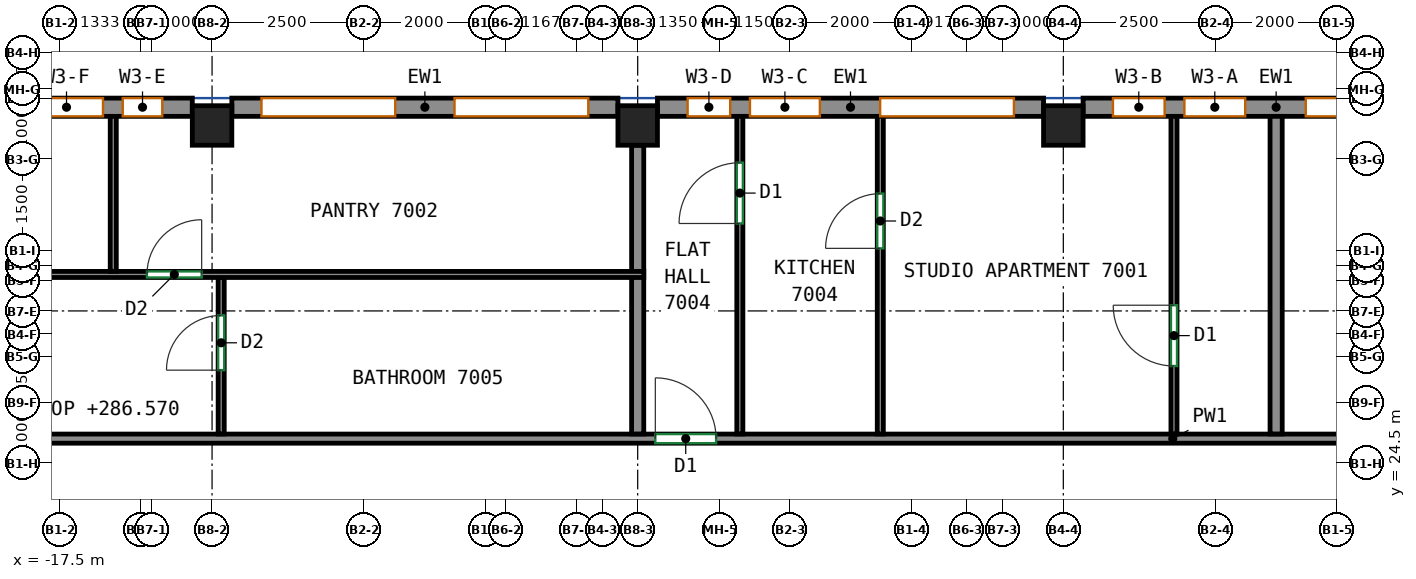
"""IFC4 building model, lengths in metres.
Left out: names, types, materials, properties, quantities, classifications, styles, units other than length and angle.
Written with IfcOpenShell. Run it as: python <this file> out.ifc"""

import sys

from ifc_helpers import new_model, si_unit, direction, frame, frame_2d, origin, origin_2d, place, context, subcontext, project, spatial, rectangle, extrude, source, transform, mapped, element, fill, save


model = new_model("IFC4")
c1 = context("Model", 3, precision=1e-05, world=origin(), true_north=direction((0.0, 1.0)))
c2 = subcontext(c1, "Body", "Model", "MODEL_VIEW")
j1 = project(units=[si_unit("LENGTHUNIT", "METRE"), si_unit("PLANEANGLEUNIT", "RADIAN")], contexts=[c1])
p1 = place(None, origin())
s1 = spatial("IfcSite", under=j1, at=p1, CompositionType="ELEMENT")
p2 = place(p1, origin())
s2 = spatial("IfcBuilding", under=s1, at=p2, CompositionType="ELEMENT")
p3 = place(p2, frame((0.0, 0.0, 284.0)))
s3 = spatial("IfcBuildingStorey", under=s2, at=p3, CompositionType="ELEMENT", Elevation=284.0)
m1 = source(origin(), c2, "Body", "SweptSolid", [
    extrude(rectangle(XDim=0.65, YDim=0.65, at=origin_2d()), origin(), (0.0, 0.0, 1.0), 3.12),
])
for number, where, z_axis, x_axis in (
    (1, (-15.0, 30.05, 0.0), (0.0, 0.0, 1.0), (1.0, 0.0, 0.0)),
    (2, (-8.0, 30.05, 0.0), (0.0, 0.0, 1.0), (1.0, 0.0, 0.0)),
    (3, (-1.0, 30.05, 0.0), (0.0, 0.0, 1.0), (1.0, 0.0, 0.0)),
):
    element("IfcColumn", number, at=place(p3, frame(where, z_axis=z_axis, x_axis=x_axis)), inside=s3, PredefinedType="COLUMN", context=c2, shape_type="MappedRepresentation", body=[
        mapped(m1, transform((0.0, 0.0, 0.0))),
    ])
m2 = source(origin(), c2, "Body", "SweptSolid", [
    extrude(rectangle(XDim=6.35, YDim=0.3, at=frame_2d((3.175, 0.0))), origin(), (0.0, 0.0, 1.0), 3.12),
])
p4 = place(p3, frame((5.675, 30.35, 0.0), z_axis=(0.0, 0.0, 1.0), x_axis=(-1.0, 0.0, 0.0)))
e4 = element("IfcWall", 4, at=p4, inside=s3, PredefinedType="SOLIDWALL", context=c2, shape_type="MappedRepresentation", body=[
    mapped(m2, transform((0.0, 0.0, 0.0))),
])
p5 = place(p4, frame((0.488, 0.0, 0.8)))
e5 = element("IfcOpeningElement", 5, at=p5, cuts=e4, PredefinedType="OPENING", context=c2, shape_type="SweptSolid", body=[
    extrude(rectangle(XDim=2.2, YDim=2.05, at=frame_2d((1.1, 1.025))), frame((0.0, 0.16, 0.0), z_axis=(0.0, -1.0, 0.0), x_axis=(1.0, 0.0, 0.0)), (0.0, 0.0, 1.0), 0.32),
])
p6 = place(p4, frame((3.684, 0.0, 0.8)))
e6 = element("IfcOpeningElement", 6, at=p6, cuts=e4, PredefinedType="OPENING", context=c2, shape_type="SweptSolid", body=[
    extrude(rectangle(XDim=1.0, YDim=2.05, at=frame_2d((0.5, 1.025))), frame((0.0, 0.16, 0.0), z_axis=(0.0, -1.0, 0.0), x_axis=(1.0, 0.0, 0.0)), (0.0, 0.0, 1.0), 0.32),
])
p7 = place(p4, frame((5.009, 0.0, 0.8)))
e7 = element("IfcOpeningElement", 7, at=p7, cuts=e4, PredefinedType="OPENING", context=c2, shape_type="SweptSolid", body=[
    extrude(rectangle(XDim=0.85, YDim=2.05, at=frame_2d((0.425, 1.025))), frame((0.0, 0.16, 0.0), z_axis=(0.0, -1.0, 0.0), x_axis=(1.0, 0.0, 0.0)), (0.0, 0.0, 1.0), 0.32),
])
p8 = place(p3, frame((-1.325, 30.35, 0.0), z_axis=(0.0, 0.0, 1.0), x_axis=(-1.0, 0.0, 0.0)))
e8 = element("IfcWall", 8, at=p8, inside=s3, PredefinedType="SOLIDWALL", context=c2, shape_type="MappedRepresentation", body=[
    mapped(m2, transform((0.0, 0.0, 0.0))),
])
p9 = place(p8, frame((0.488, 0.0, 0.8)))
e9 = element("IfcOpeningElement", 9, at=p9, cuts=e8, PredefinedType="OPENING", context=c2, shape_type="SweptSolid", body=[
    extrude(rectangle(XDim=2.2, YDim=2.05, at=frame_2d((1.1, 1.025))), frame((0.0, 0.16, 0.0), z_axis=(0.0, -1.0, 0.0), x_axis=(1.0, 0.0, 0.0)), (0.0, 0.0, 1.0), 0.32),
])
p10 = place(p8, frame((3.679, 0.0, 0.8)))
e10 = element("IfcOpeningElement", 10, at=p10, cuts=e8, PredefinedType="OPENING", context=c2, shape_type="SweptSolid", body=[
    extrude(rectangle(XDim=1.15, YDim=2.05, at=frame_2d((0.575, 1.025))), frame((0.0, 0.16, 0.0), z_axis=(0.0, -1.0, 0.0), x_axis=(1.0, 0.0, 0.0)), (0.0, 0.0, 1.0), 0.32),
])
p11 = place(p8, frame((5.154, 0.0, 0.8)))
e11 = element("IfcOpeningElement", 11, at=p11, cuts=e8, PredefinedType="OPENING", context=c2, shape_type="SweptSolid", body=[
    extrude(rectangle(XDim=0.7, YDim=2.05, at=frame_2d((0.35, 1.025))), frame((0.0, 0.16, 0.0), z_axis=(0.0, -1.0, 0.0), x_axis=(1.0, 0.0, 0.0)), (0.0, 0.0, 1.0), 0.32),
])
p12 = place(p3, frame((-8.325, 30.35, 0.0), z_axis=(0.0, 0.0, 1.0), x_axis=(-1.0, 0.0, 0.0)))
e12 = element("IfcWall", 12, at=p12, inside=s3, PredefinedType="SOLIDWALL", context=c2, shape_type="MappedRepresentation", body=[
    mapped(m2, transform((0.0, 0.0, 0.0))),
])
p13 = place(p12, frame((0.488, 0.0, 0.8)))
e13 = element("IfcOpeningElement", 13, at=p13, cuts=e12, PredefinedType="OPENING", context=c2, shape_type="SweptSolid", body=[
    extrude(rectangle(XDim=2.2, YDim=2.05, at=frame_2d((1.1, 1.025))), frame((0.0, 0.16, 0.0), z_axis=(0.0, -1.0, 0.0), x_axis=(1.0, 0.0, 0.0)), (0.0, 0.0, 1.0), 0.32),
])
p14 = place(p12, frame((3.663, 0.0, 0.8)))
e14 = element("IfcOpeningElement", 14, at=p14, cuts=e12, PredefinedType="OPENING", context=c2, shape_type="SweptSolid", body=[
    extrude(rectangle(XDim=2.2, YDim=2.05, at=frame_2d((1.1, 1.025))), frame((0.0, 0.16, 0.0), z_axis=(0.0, -1.0, 0.0), x_axis=(1.0, 0.0, 0.0)), (0.0, 0.0, 1.0), 0.32),
])
p15 = place(p3, frame((-15.325, 30.35, 0.0), z_axis=(0.0, 0.0, 1.0), x_axis=(-1.0, 0.0, 0.0)))
e15 = element("IfcWall", 15, at=p15, inside=s3, PredefinedType="SOLIDWALL", context=c2, shape_type="MappedRepresentation", body=[
    mapped(m2, transform((0.0, 0.0, 0.0))),
])
p16 = place(p15, frame((0.494, 0.0, 0.8)))
e16 = element("IfcOpeningElement", 16, at=p16, cuts=e15, PredefinedType="OPENING", context=c2, shape_type="SweptSolid", body=[
    extrude(rectangle(XDim=0.65, YDim=2.05, at=frame_2d((0.325, 1.025))), frame((0.0, 0.16, 0.0), z_axis=(0.0, -1.0, 0.0), x_axis=(1.0, 0.0, 0.0)), (0.0, 0.0, 1.0), 0.32),
])
p17 = place(p15, frame((3.663, 0.0, 0.8)))
e17 = element("IfcOpeningElement", 17, at=p17, cuts=e15, PredefinedType="OPENING", context=c2, shape_type="SweptSolid", body=[
    extrude(rectangle(XDim=2.2, YDim=2.05, at=frame_2d((1.1, 1.025))), frame((0.0, 0.16, 0.0), z_axis=(0.0, -1.0, 0.0), x_axis=(1.0, 0.0, 0.0)), (0.0, 0.0, 1.0), 0.32),
])
p18 = place(p15, frame((1.469, 0.0, 0.8)))
e18 = element("IfcOpeningElement", 18, at=p18, cuts=e15, PredefinedType="OPENING", context=c2, shape_type="SweptSolid", body=[
    extrude(rectangle(XDim=1.2, YDim=2.05, at=frame_2d((0.6, 1.025))), frame((0.0, 0.16, 0.0), z_axis=(0.0, -1.0, 0.0), x_axis=(1.0, 0.0, 0.0)), (0.0, 0.0, 1.0), 0.32),
])
p19 = place(p3, frame((-19.075, 24.9, 0.0), z_axis=(0.0, 0.0, 1.0), x_axis=(1.0, 0.0, 0.0)))
e19 = element("IfcWall", 19, at=p19, inside=s3, PredefinedType="PARTITIONING", context=c2, shape_type="SweptSolid", body=[
    extrude(rectangle(XDim=39.75, YDim=0.15, at=frame_2d((19.875, 0.0))), origin(), (0.0, 0.0, 1.0), 3.12),
])
p20 = place(p19, frame((11.365, 0.0, 0.0)))
e20 = element("IfcOpeningElement", 20, at=p20, cuts=e19, PredefinedType="OPENING", context=c2, shape_type="SweptSolid", body=[
    extrude(rectangle(XDim=1.0, YDim=2.1, at=frame_2d((0.5, 1.05))), frame((0.0, 0.085, 0.0), z_axis=(0.0, -1.0, 0.0), x_axis=(1.0, 0.0, 0.0)), (0.0, 0.0, 1.0), 0.17),
])
p21 = place(p19, frame((33.379, 0.0, 0.0)))
e21 = element("IfcOpeningElement", 21, at=p21, cuts=e19, PredefinedType="OPENING", context=c2, shape_type="SweptSolid", body=[
    extrude(rectangle(XDim=0.9, YDim=2.1, at=frame_2d((0.45, 1.05))), frame((0.0, 0.085, 0.0), z_axis=(0.0, -1.0, 0.0), x_axis=(1.0, 0.0, 0.0)), (0.0, 0.0, 1.0), 0.17),
])
p22 = place(p3, frame((2.5, 30.25, 0.0), z_axis=(0.0, 0.0, 1.0), x_axis=(0.0, -1.0, 0.0)))
e22 = element("IfcWall", 22, at=p22, inside=s3, PredefinedType="PARTITIONING", context=c2, shape_type="SweptSolid", body=[
    extrude(rectangle(XDim=5.273, YDim=0.2, at=frame_2d((2.636, 0.0))), origin(), (0.0, 0.0, 1.0), 3.12),
])
p23 = place(p3, frame((-6.32, 24.977, 0.0), z_axis=(0.0, 0.0, 1.0), x_axis=(0.0, 1.0, 0.0)))
e23 = element("IfcWall", 23, at=p23, inside=s3, PredefinedType="PARTITIONING", context=c2, shape_type="SweptSolid", body=[
    extrude(rectangle(XDim=5.273, YDim=0.1, at=frame_2d((2.636, 0.0))), origin(), (0.0, 0.0, 1.0), 3.12),
])
p24 = place(p23, frame((3.461, 0.0, 0.0)))
e24 = element("IfcOpeningElement", 24, at=p24, cuts=e23, PredefinedType="OPENING", context=c2, shape_type="SweptSolid", body=[
    extrude(rectangle(XDim=1.0, YDim=2.1, at=frame_2d((0.5, 1.05))), frame((0.0, 0.06, 0.0), z_axis=(0.0, -1.0, 0.0), x_axis=(1.0, 0.0, 0.0)), (0.0, 0.0, 1.0), 0.12),
])
p25 = place(p3, frame((-8.0, 24.977, 0.0), z_axis=(0.0, 0.0, 1.0), x_axis=(0.0, 1.0, 0.0)))
e25 = element("IfcWall", 25, at=p25, inside=s3, PredefinedType="PARTITIONING", context=c2, shape_type="SweptSolid", body=[
    extrude(rectangle(XDim=2.583, YDim=0.2, at=frame_2d((1.292, 0.0))), origin(), (0.0, 0.0, 1.0), 3.12),
])
p26 = place(p3, frame((-8.0, 27.642, 0.0), z_axis=(0.0, 0.0, 1.0), x_axis=(0.0, 1.0, 0.0)))
e26 = element("IfcWall", 26, at=p26, inside=s3, PredefinedType="PARTITIONING", context=c2, shape_type="SweptSolid", body=[
    extrude(rectangle(XDim=2.083, YDim=0.2, at=frame_2d((1.042, 0.0))), origin(), (0.0, 0.0, 1.0), 3.12),
])
p27 = place(p3, frame((-4.01, 24.977, 0.0), z_axis=(0.0, 0.0, 1.0), x_axis=(0.0, 1.0, 0.0)))
e27 = element("IfcWall", 27, at=p27, inside=s3, PredefinedType="PARTITIONING", context=c2, shape_type="SweptSolid", body=[
    extrude(rectangle(XDim=5.273, YDim=0.1, at=frame_2d((2.636, 0.0))), origin(), (0.0, 0.0, 1.0), 3.12),
])
p28 = place(p27, frame((3.052, 0.0, 0.0)))
e28 = element("IfcOpeningElement", 28, at=p28, cuts=e27, PredefinedType="OPENING", context=c2, shape_type="SweptSolid", body=[
    extrude(rectangle(XDim=0.9, YDim=2.1, at=frame_2d((0.45, 1.05))), frame((0.0, 0.06, 0.0), z_axis=(0.0, -1.0, 0.0), x_axis=(1.0, 0.0, 0.0)), (0.0, 0.0, 1.0), 0.12),
])
p29 = place(p3, frame((0.82, 24.977, 0.0), z_axis=(0.0, 0.0, 1.0), x_axis=(0.0, 1.0, 0.0)))
e29 = element("IfcWall", 29, at=p29, inside=s3, PredefinedType="PARTITIONING", context=c2, shape_type="SweptSolid", body=[
    extrude(rectangle(XDim=5.273, YDim=0.1, at=frame_2d((2.636, 0.0))), origin(), (0.0, 0.0, 1.0), 3.12),
])
p30 = place(p29, frame((1.117, 0.0, 0.0)))
e30 = element("IfcOpeningElement", 30, at=p30, cuts=e29, PredefinedType="OPENING", context=c2, shape_type="SweptSolid", body=[
    extrude(rectangle(XDim=1.0, YDim=2.1, at=frame_2d((0.5, 1.05))), frame((0.0, 0.06, 0.0), z_axis=(0.0, -1.0, 0.0), x_axis=(1.0, 0.0, 0.0)), (0.0, 0.0, 1.0), 0.12),
])
p31 = place(p3, frame((-14.85, 24.977, 0.0), z_axis=(0.0, 0.0, 1.0), x_axis=(0.0, 1.0, 0.0)))
e31 = element("IfcWall", 31, at=p31, inside=s3, PredefinedType="PARTITIONING", context=c2, shape_type="SweptSolid", body=[
    extrude(rectangle(XDim=2.573, YDim=0.1, at=frame_2d((1.287, 0.0))), origin(), (0.0, 0.0, 1.0), 3.12),
])
p32 = place(p31, frame((1.049, 0.0, 0.0)))
e32 = element("IfcOpeningElement", 32, at=p32, cuts=e31, PredefinedType="OPENING", context=c2, shape_type="SweptSolid", body=[
    extrude(rectangle(XDim=0.9, YDim=2.1, at=frame_2d((0.45, 1.05))), frame((0.0, 0.06, 0.0), z_axis=(0.0, -1.0, 0.0), x_axis=(1.0, 0.0, 0.0)), (0.0, 0.0, 1.0), 0.12),
])
p33 = place(p3, frame((-21.75, 27.6, 0.0), z_axis=(0.0, 0.0, 1.0), x_axis=(1.0, 0.0, 0.0)))
e33 = element("IfcWall", 33, at=p33, inside=s3, PredefinedType="PARTITIONING", context=c2, shape_type="SweptSolid", body=[
    extrude(rectangle(XDim=13.85, YDim=0.1, at=frame_2d((6.925, 0.0))), origin(), (0.0, 0.0, 1.0), 3.12),
])
p34 = place(p33, frame((5.679, 0.0, 0.0)))
e34 = element("IfcOpeningElement", 34, at=p34, cuts=e33, PredefinedType="OPENING", context=c2, shape_type="SweptSolid", body=[
    extrude(rectangle(XDim=0.9, YDim=2.1, at=frame_2d((0.45, 1.05))), frame((0.0, 0.06, 0.0), z_axis=(0.0, -1.0, 0.0), x_axis=(1.0, 0.0, 0.0)), (0.0, 0.0, 1.0), 0.12),
])
p35 = place(p3, frame((-16.625, 27.652, 0.0), z_axis=(0.0, 0.0, 1.0), x_axis=(0.0, 1.0, 0.0)))
e35 = element("IfcWall", 35, at=p35, inside=s3, PredefinedType="PARTITIONING", context=c2, shape_type="SweptSolid", body=[
    extrude(rectangle(XDim=2.598, YDim=0.1, at=frame_2d((1.299, 0.0))), origin(), (0.0, 0.0, 1.0), 3.12),
])
p36 = place(p5, origin())
e36 = element("IfcWindow", 36, at=p36, inside=s3, PartitioningType="SINGLE_PANEL", PredefinedType="WINDOW", context=c2, shape_type="SweptSolid", body=[
    extrude(rectangle(XDim=2.2, YDim=2.05, at=frame_2d((1.1, 1.025))), frame((0.0, 0.03, 0.0), z_axis=(0.0, -1.0, 0.0), x_axis=(1.0, 0.0, 0.0)), (0.0, 0.0, 1.0), 0.06),
])
fill(e5, e36)
p37 = place(p6, origin())
e37 = element("IfcWindow", 37, at=p37, inside=s3, PartitioningType="SINGLE_PANEL", PredefinedType="WINDOW", context=c2, shape_type="SweptSolid", body=[
    extrude(rectangle(XDim=1.0, YDim=2.05, at=frame_2d((0.5, 1.025))), frame((0.0, 0.03, 0.0), z_axis=(0.0, -1.0, 0.0), x_axis=(1.0, 0.0, 0.0)), (0.0, 0.0, 1.0), 0.06),
])
fill(e6, e37)
p38 = place(p9, origin())
e38 = element("IfcWindow", 38, at=p38, inside=s3, PartitioningType="SINGLE_PANEL", PredefinedType="WINDOW", context=c2, shape_type="SweptSolid", body=[
    extrude(rectangle(XDim=2.2, YDim=2.05, at=frame_2d((1.1, 1.025))), frame((0.0, 0.03, 0.0), z_axis=(0.0, -1.0, 0.0), x_axis=(1.0, 0.0, 0.0)), (0.0, 0.0, 1.0), 0.06),
])
fill(e9, e38)
p39 = place(p10, origin())
e39 = element("IfcWindow", 39, at=p39, inside=s3, PartitioningType="SINGLE_PANEL", PredefinedType="WINDOW", context=c2, shape_type="SweptSolid", body=[
    extrude(rectangle(XDim=1.15, YDim=2.05, at=frame_2d((0.575, 1.025))), frame((0.0, 0.03, 0.0), z_axis=(0.0, -1.0, 0.0), x_axis=(1.0, 0.0, 0.0)), (0.0, 0.0, 1.0), 0.06),
])
fill(e10, e39)
p40 = place(p13, origin())
e40 = element("IfcWindow", 40, at=p40, inside=s3, PartitioningType="SINGLE_PANEL", PredefinedType="WINDOW", context=c2, shape_type="SweptSolid", body=[
    extrude(rectangle(XDim=2.2, YDim=2.05, at=frame_2d((1.1, 1.025))), frame((0.0, 0.03, 0.0), z_axis=(0.0, -1.0, 0.0), x_axis=(1.0, 0.0, 0.0)), (0.0, 0.0, 1.0), 0.06),
])
fill(e13, e40)
p41 = place(p14, origin())
e41 = element("IfcWindow", 41, at=p41, inside=s3, PartitioningType="SINGLE_PANEL", PredefinedType="WINDOW", context=c2, shape_type="SweptSolid", body=[
    extrude(rectangle(XDim=2.2, YDim=2.05, at=frame_2d((1.1, 1.025))), frame((0.0, 0.03, 0.0), z_axis=(0.0, -1.0, 0.0), x_axis=(1.0, 0.0, 0.0)), (0.0, 0.0, 1.0), 0.06),
])
fill(e14, e41)
p42 = place(p16, origin())
e42 = element("IfcWindow", 42, at=p42, inside=s3, PartitioningType="SINGLE_PANEL", PredefinedType="WINDOW", context=c2, shape_type="SweptSolid", body=[
    extrude(rectangle(XDim=0.65, YDim=2.05, at=frame_2d((0.325, 1.025))), frame((0.0, 0.03, 0.0), z_axis=(0.0, -1.0, 0.0), x_axis=(1.0, 0.0, 0.0)), (0.0, 0.0, 1.0), 0.06),
])
fill(e16, e42)
p43 = place(p20, origin())
e43 = element("IfcDoor", 43, at=p43, inside=s3, OperationType="SINGLE_SWING_LEFT", PredefinedType="DOOR", context=c2, shape_type="SweptSolid", body=[
    extrude(rectangle(XDim=1.0, YDim=2.1, at=frame_2d((0.5, 1.05))), frame((0.0, 0.025, 0.0), z_axis=(0.0, -1.0, 0.0), x_axis=(1.0, 0.0, 0.0)), (0.0, 0.0, 1.0), 0.05),
])
fill(e20, e43)
p44 = place(p32, origin())
e44 = element("IfcDoor", 44, at=p44, inside=s3, OperationType="SINGLE_SWING_LEFT", PredefinedType="DOOR", context=c2, shape_type="SweptSolid", body=[
    extrude(rectangle(XDim=0.9, YDim=2.1, at=frame_2d((0.45, 1.05))), frame((0.0, 0.025, 0.0), z_axis=(0.0, -1.0, 0.0), x_axis=(1.0, 0.0, 0.0)), (0.0, 0.0, 1.0), 0.05),
])
fill(e32, e44)
p45 = place(p30, origin())
e45 = element("IfcDoor", 45, at=p45, inside=s3, OperationType="SINGLE_SWING_RIGHT", PredefinedType="DOOR", context=c2, shape_type="SweptSolid", body=[
    extrude(rectangle(XDim=1.0, YDim=2.1, at=frame_2d((0.5, 1.05))), frame((0.0, 0.025, 0.0), z_axis=(0.0, -1.0, 0.0), x_axis=(1.0, 0.0, 0.0)), (0.0, 0.0, 1.0), 0.05),
])
fill(e30, e45)
p46 = place(p34, origin())
e46 = element("IfcDoor", 46, at=p46, inside=s3, OperationType="SINGLE_SWING_RIGHT", PredefinedType="DOOR", context=c2, shape_type="SweptSolid", body=[
    extrude(rectangle(XDim=0.9, YDim=2.1, at=frame_2d((0.45, 1.05))), frame((0.0, 0.025, 0.0), z_axis=(0.0, -1.0, 0.0), x_axis=(1.0, 0.0, 0.0)), (0.0, 0.0, 1.0), 0.05),
])
fill(e34, e46)
p47 = place(p28, origin())
e47 = element("IfcDoor", 47, at=p47, inside=s3, OperationType="SINGLE_SWING_LEFT", PredefinedType="DOOR", context=c2, shape_type="SweptSolid", body=[
    extrude(rectangle(XDim=0.9, YDim=2.1, at=frame_2d((0.45, 1.05))), frame((0.0, 0.025, 0.0), z_axis=(0.0, -1.0, 0.0), x_axis=(1.0, 0.0, 0.0)), (0.0, 0.0, 1.0), 0.05),
])
fill(e28, e47)
p48 = place(p24, origin())
e48 = element("IfcDoor", 48, at=p48, inside=s3, OperationType="SINGLE_SWING_LEFT", PredefinedType="DOOR", context=c2, shape_type="SweptSolid", body=[
    extrude(rectangle(XDim=1.0, YDim=2.1, at=frame_2d((0.5, 1.05))), frame((0.0, 0.025, 0.0), z_axis=(0.0, -1.0, 0.0), x_axis=(1.0, 0.0, 0.0)), (0.0, 0.0, 1.0), 0.05),
])
fill(e24, e48)
p49 = place(p7, origin())
e49 = element("IfcWindow", 49, at=p49, inside=s3, PartitioningType="SINGLE_PANEL", PredefinedType="WINDOW", context=c2, shape_type="SweptSolid", body=[
    extrude(rectangle(XDim=0.85, YDim=2.05, at=frame_2d((0.425, 1.025))), frame((0.0, 0.03, 0.0), z_axis=(0.0, -1.0, 0.0), x_axis=(1.0, 0.0, 0.0)), (0.0, 0.0, 1.0), 0.06),
])
fill(e7, e49)
p50 = place(p11, origin())
e50 = element("IfcWindow", 50, at=p50, inside=s3, PartitioningType="SINGLE_PANEL", PredefinedType="WINDOW", context=c2, shape_type="SweptSolid", body=[
    extrude(rectangle(XDim=0.7, YDim=2.05, at=frame_2d((0.35, 1.025))), frame((0.0, 0.03, 0.0), z_axis=(0.0, -1.0, 0.0), x_axis=(1.0, 0.0, 0.0)), (0.0, 0.0, 1.0), 0.06),
])
fill(e11, e50)
p51 = place(p18, origin())
e51 = element("IfcWindow", 51, at=p51, inside=s3, PartitioningType="SINGLE_PANEL", PredefinedType="WINDOW", context=c2, shape_type="SweptSolid", body=[
    extrude(rectangle(XDim=1.2, YDim=2.05, at=frame_2d((0.6, 1.025))), frame((0.0, 0.03, 0.0), z_axis=(0.0, -1.0, 0.0), x_axis=(1.0, 0.0, 0.0)), (0.0, 0.0, 1.0), 0.06),
])
fill(e18, e51)
save(model, sys.argv[1])
